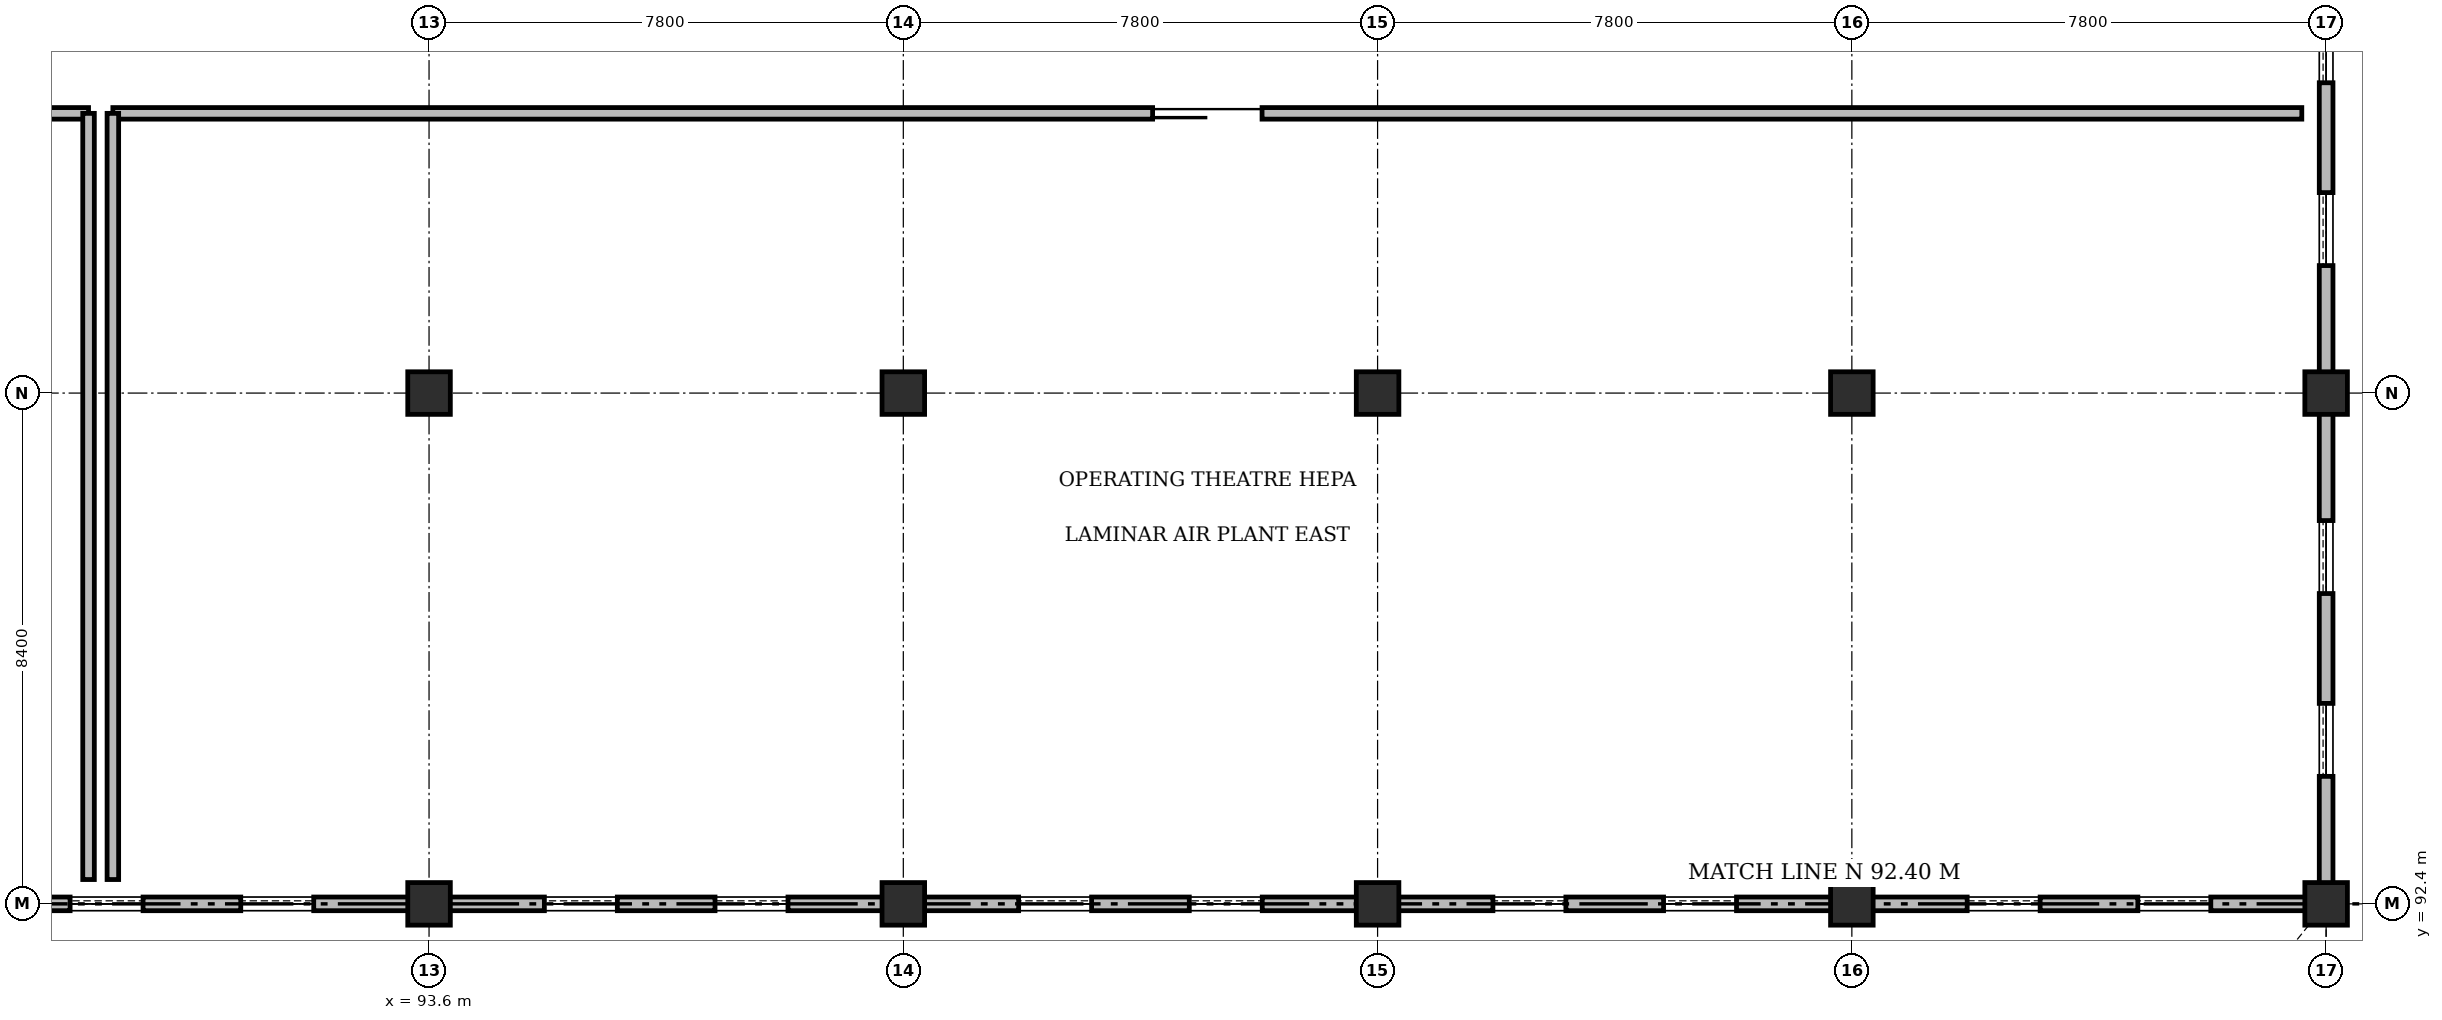
"""IFC4 building model, lengths in metres.
Left out: names, types, materials, properties, quantities, classifications, styles, units other than length and angle.
Written with IfcOpenShell. Run it as: python <this file> out.ifc"""

import sys

from ifc_helpers import new_model, si_unit, direction, frame, frame_2d, origin, origin_2d, place, context, subcontext, project, spatial, rectangle, extrude, element, fill, save


model = new_model("IFC4")
c1 = context("Model", 3, precision=1e-05, world=origin(), true_north=direction((0.0, 1.0)))
c2 = subcontext(c1, "Body", "Model", "MODEL_VIEW")
j1 = project(units=[si_unit("LENGTHUNIT", "METRE"), si_unit("PLANEANGLEUNIT", "RADIAN")], contexts=[c1])
p1 = place(None, origin())
s1 = spatial("IfcSite", under=j1, at=p1, CompositionType="ELEMENT")
p2 = place(p1, origin())
s2 = spatial("IfcBuilding", under=s1, at=p2, CompositionType="ELEMENT")
p3 = place(p2, frame((0.0, 0.0, 14.4)))
s3 = spatial("IfcBuildingStorey", under=s2, at=p3, CompositionType="ELEMENT", Elevation=14.4)
for number, where, z_axis, x_axis in (
    (1, (93.6, 92.4, 0.0), (0.0, 0.0, 1.0), (1.0, 0.0, 0.0)),
    (2, (93.6, 100.8, 0.0), (0.0, 0.0, 1.0), (1.0, 0.0, 0.0)),
    (3, (101.4, 92.4, 0.0), (0.0, 0.0, 1.0), (1.0, 0.0, 0.0)),
    (4, (101.4, 100.8, 0.0), (0.0, 0.0, 1.0), (1.0, 0.0, 0.0)),
    (5, (109.2, 92.4, 0.0), (0.0, 0.0, 1.0), (1.0, 0.0, 0.0)),
    (6, (109.2, 100.8, 0.0), (0.0, 0.0, 1.0), (1.0, 0.0, 0.0)),
    (7, (117.0, 92.4, 0.0), (0.0, 0.0, 1.0), (1.0, 0.0, 0.0)),
    (8, (117.0, 100.8, 0.0), (0.0, 0.0, 1.0), (1.0, 0.0, 0.0)),
    (9, (124.8, 92.4, 0.0), (0.0, 0.0, 1.0), (1.0, 0.0, 0.0)),
    (10, (124.8, 100.8, 0.0), (0.0, 0.0, 1.0), (1.0, 0.0, 0.0)),
):
    element("IfcColumn", number, at=place(p3, frame(where, z_axis=z_axis, x_axis=x_axis)), inside=s3, PredefinedType="COLUMN", context=c2, shape_type="SweptSolid", body=[
        extrude(rectangle(XDim=0.7, YDim=0.7, at=origin_2d()), origin(), (0.0, 0.0, 1.0), 3.6),
    ])
p4 = place(p3, frame((93.31, 92.4, 0.0), z_axis=(0.0, 0.0, 1.0), x_axis=(-1.0, 0.0, 0.0)))
e11 = element("IfcWall", 11, at=p4, inside=s3, PredefinedType="STANDARD", context=c2, shape_type="SweptSolid", body=[
    extrude(rectangle(XDim=7.22, YDim=0.225, at=frame_2d((3.61, 0.0))), origin(), (0.0, 0.0, 1.0), 2.62),
])
p5 = place(p4, frame((1.607, 0.0, 0.9)))
e12 = element("IfcOpeningElement", 12, at=p5, cuts=e11, PredefinedType="OPENING", context=c2, shape_type="SweptSolid", body=[
    extrude(rectangle(XDim=1.2, YDim=1.05, at=frame_2d((0.6, 0.525))), frame((0.0, 0.123, 0.0), z_axis=(0.0, -1.0, 0.0), x_axis=(1.0, 0.0, 0.0)), (0.0, 0.0, 1.0), 0.245),
])
p6 = place(p4, frame((4.413, 0.0, 0.9)))
e13 = element("IfcOpeningElement", 13, at=p6, cuts=e11, PredefinedType="OPENING", context=c2, shape_type="SweptSolid", body=[
    extrude(rectangle(XDim=1.2, YDim=1.05, at=frame_2d((0.6, 0.525))), frame((0.0, 0.123, 0.0), z_axis=(0.0, -1.0, 0.0), x_axis=(1.0, 0.0, 0.0)), (0.0, 0.0, 1.0), 0.245),
])
p7 = place(p3, frame((101.11, 92.4, 0.0), z_axis=(0.0, 0.0, 1.0), x_axis=(-1.0, 0.0, 0.0)))
e14 = element("IfcWall", 14, at=p7, inside=s3, PredefinedType="STANDARD", context=c2, shape_type="SweptSolid", body=[
    extrude(rectangle(XDim=7.22, YDim=0.225, at=frame_2d((3.61, 0.0))), origin(), (0.0, 0.0, 1.0), 2.62),
])
p8 = place(p7, frame((1.607, 0.0, 0.9)))
e15 = element("IfcOpeningElement", 15, at=p8, cuts=e14, PredefinedType="OPENING", context=c2, shape_type="SweptSolid", body=[
    extrude(rectangle(XDim=1.2, YDim=1.05, at=frame_2d((0.6, 0.525))), frame((0.0, 0.123, 0.0), z_axis=(0.0, -1.0, 0.0), x_axis=(1.0, 0.0, 0.0)), (0.0, 0.0, 1.0), 0.245),
])
p9 = place(p7, frame((4.413, 0.0, 0.9)))
e16 = element("IfcOpeningElement", 16, at=p9, cuts=e14, PredefinedType="OPENING", context=c2, shape_type="SweptSolid", body=[
    extrude(rectangle(XDim=1.2, YDim=1.05, at=frame_2d((0.6, 0.525))), frame((0.0, 0.123, 0.0), z_axis=(0.0, -1.0, 0.0), x_axis=(1.0, 0.0, 0.0)), (0.0, 0.0, 1.0), 0.245),
])
p10 = place(p3, frame((108.91, 92.4, 0.0), z_axis=(0.0, 0.0, 1.0), x_axis=(-1.0, 0.0, 0.0)))
e17 = element("IfcWall", 17, at=p10, inside=s3, PredefinedType="STANDARD", context=c2, shape_type="SweptSolid", body=[
    extrude(rectangle(XDim=7.22, YDim=0.225, at=frame_2d((3.61, 0.0))), origin(), (0.0, 0.0, 1.0), 2.62),
])
p11 = place(p10, frame((1.607, 0.0, 0.9)))
e18 = element("IfcOpeningElement", 18, at=p11, cuts=e17, PredefinedType="OPENING", context=c2, shape_type="SweptSolid", body=[
    extrude(rectangle(XDim=1.2, YDim=1.05, at=frame_2d((0.6, 0.525))), frame((0.0, 0.123, 0.0), z_axis=(0.0, -1.0, 0.0), x_axis=(1.0, 0.0, 0.0)), (0.0, 0.0, 1.0), 0.245),
])
p12 = place(p10, frame((4.413, 0.0, 0.9)))
e19 = element("IfcOpeningElement", 19, at=p12, cuts=e17, PredefinedType="OPENING", context=c2, shape_type="SweptSolid", body=[
    extrude(rectangle(XDim=1.2, YDim=1.05, at=frame_2d((0.6, 0.525))), frame((0.0, 0.123, 0.0), z_axis=(0.0, -1.0, 0.0), x_axis=(1.0, 0.0, 0.0)), (0.0, 0.0, 1.0), 0.245),
])
p13 = place(p3, frame((116.71, 92.4, 0.0), z_axis=(0.0, 0.0, 1.0), x_axis=(-1.0, 0.0, 0.0)))
e20 = element("IfcWall", 20, at=p13, inside=s3, PredefinedType="STANDARD", context=c2, shape_type="SweptSolid", body=[
    extrude(rectangle(XDim=7.22, YDim=0.225, at=frame_2d((3.61, 0.0))), origin(), (0.0, 0.0, 1.0), 2.62),
])
p14 = place(p13, frame((1.607, 0.0, 0.9)))
e21 = element("IfcOpeningElement", 21, at=p14, cuts=e20, PredefinedType="OPENING", context=c2, shape_type="SweptSolid", body=[
    extrude(rectangle(XDim=1.2, YDim=1.05, at=frame_2d((0.6, 0.525))), frame((0.0, 0.123, 0.0), z_axis=(0.0, -1.0, 0.0), x_axis=(1.0, 0.0, 0.0)), (0.0, 0.0, 1.0), 0.245),
])
p15 = place(p13, frame((4.413, 0.0, 0.9)))
e22 = element("IfcOpeningElement", 22, at=p15, cuts=e20, PredefinedType="OPENING", context=c2, shape_type="SweptSolid", body=[
    extrude(rectangle(XDim=1.2, YDim=1.05, at=frame_2d((0.6, 0.525))), frame((0.0, 0.123, 0.0), z_axis=(0.0, -1.0, 0.0), x_axis=(1.0, 0.0, 0.0)), (0.0, 0.0, 1.0), 0.245),
])
p16 = place(p3, frame((124.51, 92.4, 0.0), z_axis=(0.0, 0.0, 1.0), x_axis=(-1.0, 0.0, 0.0)))
e23 = element("IfcWall", 23, at=p16, inside=s3, PredefinedType="STANDARD", context=c2, shape_type="SweptSolid", body=[
    extrude(rectangle(XDim=7.22, YDim=0.225, at=frame_2d((3.61, 0.0))), origin(), (0.0, 0.0, 1.0), 2.62),
])
p17 = place(p16, frame((1.607, 0.0, 0.9)))
e24 = element("IfcOpeningElement", 24, at=p17, cuts=e23, PredefinedType="OPENING", context=c2, shape_type="SweptSolid", body=[
    extrude(rectangle(XDim=1.2, YDim=1.05, at=frame_2d((0.6, 0.525))), frame((0.0, 0.123, 0.0), z_axis=(0.0, -1.0, 0.0), x_axis=(1.0, 0.0, 0.0)), (0.0, 0.0, 1.0), 0.245),
])
p18 = place(p16, frame((4.413, 0.0, 0.9)))
e25 = element("IfcOpeningElement", 25, at=p18, cuts=e23, PredefinedType="OPENING", context=c2, shape_type="SweptSolid", body=[
    extrude(rectangle(XDim=1.2, YDim=1.05, at=frame_2d((0.6, 0.525))), frame((0.0, 0.123, 0.0), z_axis=(0.0, -1.0, 0.0), x_axis=(1.0, 0.0, 0.0)), (0.0, 0.0, 1.0), 0.245),
])
p19 = place(p3, frame((124.8, 100.51, 0.0), z_axis=(0.0, 0.0, 1.0), x_axis=(0.0, -1.0, 0.0)))
e26 = element("IfcWall", 26, at=p19, inside=s3, PredefinedType="STANDARD", context=c2, shape_type="SweptSolid", body=[
    extrude(rectangle(XDim=7.82, YDim=0.225, at=frame_2d((3.91, 0.0))), origin(), (0.0, 0.0, 1.0), 2.605),
])
p20 = place(p19, frame((1.807, 0.0, 0.9)))
e27 = element("IfcOpeningElement", 27, at=p20, cuts=e26, PredefinedType="OPENING", context=c2, shape_type="SweptSolid", body=[
    extrude(rectangle(XDim=1.2, YDim=1.05, at=frame_2d((0.6, 0.525))), frame((0.0, 0.123, 0.0), z_axis=(0.0, -1.0, 0.0), x_axis=(1.0, 0.0, 0.0)), (0.0, 0.0, 1.0), 0.245),
])
p21 = place(p19, frame((4.813, 0.0, 0.9)))
e28 = element("IfcOpeningElement", 28, at=p21, cuts=e26, PredefinedType="OPENING", context=c2, shape_type="SweptSolid", body=[
    extrude(rectangle(XDim=1.2, YDim=1.05, at=frame_2d((0.6, 0.525))), frame((0.0, 0.123, 0.0), z_axis=(0.0, -1.0, 0.0), x_axis=(1.0, 0.0, 0.0)), (0.0, 0.0, 1.0), 0.245),
])
p22 = place(p3, frame((124.8, 108.91, 0.0), z_axis=(0.0, 0.0, 1.0), x_axis=(0.0, -1.0, 0.0)))
e29 = element("IfcWall", 29, at=p22, inside=s3, PredefinedType="STANDARD", context=c2, shape_type="SweptSolid", body=[
    extrude(rectangle(XDim=7.82, YDim=0.225, at=frame_2d((3.91, 0.0))), origin(), (0.0, 0.0, 1.0), 2.605),
])
p23 = place(p22, frame((1.807, 0.0, 0.9)))
e30 = element("IfcOpeningElement", 30, at=p23, cuts=e29, PredefinedType="OPENING", context=c2, shape_type="SweptSolid", body=[
    extrude(rectangle(XDim=1.2, YDim=1.05, at=frame_2d((0.6, 0.525))), frame((0.0, 0.123, 0.0), z_axis=(0.0, -1.0, 0.0), x_axis=(1.0, 0.0, 0.0)), (0.0, 0.0, 1.0), 0.245),
])
p24 = place(p22, frame((4.813, 0.0, 0.9)))
e31 = element("IfcOpeningElement", 31, at=p24, cuts=e29, PredefinedType="OPENING", context=c2, shape_type="SweptSolid", body=[
    extrude(rectangle(XDim=1.2, YDim=1.05, at=frame_2d((0.6, 0.525))), frame((0.0, 0.123, 0.0), z_axis=(0.0, -1.0, 0.0), x_axis=(1.0, 0.0, 0.0)), (0.0, 0.0, 1.0), 0.245),
])
p25 = place(p3, frame((55.0, 105.4, 0.0), z_axis=(0.0, 0.0, 1.0), x_axis=(1.0, 0.0, 0.0)))
e32 = element("IfcWall", 32, at=p25, inside=s3, PredefinedType="PARTITIONING", context=c2, shape_type="SweptSolid", body=[
    extrude(rectangle(XDim=33.0, YDim=0.19, at=frame_2d((16.5, 0.0))), origin(), (0.0, 0.0, 1.0), 3.3),
])
p26 = place(p25, frame((15.6, 0.0, 0.0)))
e33 = element("IfcOpeningElement", 33, at=p26, cuts=e32, PredefinedType="OPENING", context=c2, shape_type="SweptSolid", body=[
    extrude(rectangle(XDim=1.8, YDim=2.3, at=frame_2d((0.9, 1.15))), frame((0.0, 0.105, 0.0), z_axis=(0.0, -1.0, 0.0), x_axis=(1.0, 0.0, 0.0)), (0.0, 0.0, 1.0), 0.21),
])
p27 = place(p3, frame((88.0, 92.8, 0.0), z_axis=(0.0, 0.0, 1.0), x_axis=(0.0, 1.0, 0.0)))
e34 = element("IfcWall", 34, at=p27, inside=s3, PredefinedType="PARTITIONING", context=c2, shape_type="SweptSolid", body=[
    extrude(rectangle(XDim=12.6, YDim=0.19, at=frame_2d((6.3, 0.0))), origin(), (0.0, 0.0, 1.0), 3.3),
])
p28 = place(p3, frame((88.4, 105.4, 0.0), z_axis=(0.0, 0.0, 1.0), x_axis=(1.0, 0.0, 0.0)))
e35 = element("IfcWall", 35, at=p28, inside=s3, PredefinedType="PARTITIONING", context=c2, shape_type="SweptSolid", body=[
    extrude(rectangle(XDim=36.0, YDim=0.19, at=frame_2d((18.0, 0.0))), origin(), (0.0, 0.0, 1.0), 3.3),
])
p29 = place(p28, frame((17.1, 0.0, 0.0)))
e36 = element("IfcOpeningElement", 36, at=p29, cuts=e35, PredefinedType="OPENING", context=c2, shape_type="SweptSolid", body=[
    extrude(rectangle(XDim=1.8, YDim=2.3, at=frame_2d((0.9, 1.15))), frame((0.0, 0.105, 0.0), z_axis=(0.0, -1.0, 0.0), x_axis=(1.0, 0.0, 0.0)), (0.0, 0.0, 1.0), 0.21),
])
p30 = place(p3, frame((88.4, 92.8, 0.0), z_axis=(0.0, 0.0, 1.0), x_axis=(0.0, 1.0, 0.0)))
e37 = element("IfcWall", 37, at=p30, inside=s3, PredefinedType="PARTITIONING", context=c2, shape_type="SweptSolid", body=[
    extrude(rectangle(XDim=12.6, YDim=0.19, at=frame_2d((6.3, 0.0))), origin(), (0.0, 0.0, 1.0), 3.3),
])
p31 = place(p5, origin())
e38 = element("IfcWindow", 38, at=p31, inside=s3, PartitioningType="SINGLE_PANEL", PredefinedType="WINDOW", context=c2, shape_type="SweptSolid", body=[
    extrude(rectangle(XDim=1.2, YDim=1.05, at=frame_2d((0.6, 0.525))), frame((0.0, 0.03, 0.0), z_axis=(0.0, -1.0, 0.0), x_axis=(1.0, 0.0, 0.0)), (0.0, 0.0, 1.0), 0.06),
])
fill(e12, e38)
p32 = place(p6, origin())
e39 = element("IfcWindow", 39, at=p32, inside=s3, PartitioningType="SINGLE_PANEL", PredefinedType="WINDOW", context=c2, shape_type="SweptSolid", body=[
    extrude(rectangle(XDim=1.2, YDim=1.05, at=frame_2d((0.6, 0.525))), frame((0.0, 0.03, 0.0), z_axis=(0.0, -1.0, 0.0), x_axis=(1.0, 0.0, 0.0)), (0.0, 0.0, 1.0), 0.06),
])
fill(e13, e39)
p33 = place(p8, origin())
e40 = element("IfcWindow", 40, at=p33, inside=s3, PartitioningType="SINGLE_PANEL", PredefinedType="WINDOW", context=c2, shape_type="SweptSolid", body=[
    extrude(rectangle(XDim=1.2, YDim=1.05, at=frame_2d((0.6, 0.525))), frame((0.0, 0.03, 0.0), z_axis=(0.0, -1.0, 0.0), x_axis=(1.0, 0.0, 0.0)), (0.0, 0.0, 1.0), 0.06),
])
fill(e15, e40)
p34 = place(p9, origin())
e41 = element("IfcWindow", 41, at=p34, inside=s3, PartitioningType="SINGLE_PANEL", PredefinedType="WINDOW", context=c2, shape_type="SweptSolid", body=[
    extrude(rectangle(XDim=1.2, YDim=1.05, at=frame_2d((0.6, 0.525))), frame((0.0, 0.03, 0.0), z_axis=(0.0, -1.0, 0.0), x_axis=(1.0, 0.0, 0.0)), (0.0, 0.0, 1.0), 0.06),
])
fill(e16, e41)
p35 = place(p11, origin())
e42 = element("IfcWindow", 42, at=p35, inside=s3, PartitioningType="SINGLE_PANEL", PredefinedType="WINDOW", context=c2, shape_type="SweptSolid", body=[
    extrude(rectangle(XDim=1.2, YDim=1.05, at=frame_2d((0.6, 0.525))), frame((0.0, 0.03, 0.0), z_axis=(0.0, -1.0, 0.0), x_axis=(1.0, 0.0, 0.0)), (0.0, 0.0, 1.0), 0.06),
])
fill(e18, e42)
p36 = place(p12, origin())
e43 = element("IfcWindow", 43, at=p36, inside=s3, PartitioningType="SINGLE_PANEL", PredefinedType="WINDOW", context=c2, shape_type="SweptSolid", body=[
    extrude(rectangle(XDim=1.2, YDim=1.05, at=frame_2d((0.6, 0.525))), frame((0.0, 0.03, 0.0), z_axis=(0.0, -1.0, 0.0), x_axis=(1.0, 0.0, 0.0)), (0.0, 0.0, 1.0), 0.06),
])
fill(e19, e43)
p37 = place(p14, origin())
e44 = element("IfcWindow", 44, at=p37, inside=s3, PartitioningType="SINGLE_PANEL", PredefinedType="WINDOW", context=c2, shape_type="SweptSolid", body=[
    extrude(rectangle(XDim=1.2, YDim=1.05, at=frame_2d((0.6, 0.525))), frame((0.0, 0.03, 0.0), z_axis=(0.0, -1.0, 0.0), x_axis=(1.0, 0.0, 0.0)), (0.0, 0.0, 1.0), 0.06),
])
fill(e21, e44)
p38 = place(p15, origin())
e45 = element("IfcWindow", 45, at=p38, inside=s3, PartitioningType="SINGLE_PANEL", PredefinedType="WINDOW", context=c2, shape_type="SweptSolid", body=[
    extrude(rectangle(XDim=1.2, YDim=1.05, at=frame_2d((0.6, 0.525))), frame((0.0, 0.03, 0.0), z_axis=(0.0, -1.0, 0.0), x_axis=(1.0, 0.0, 0.0)), (0.0, 0.0, 1.0), 0.06),
])
fill(e22, e45)
p39 = place(p17, origin())
e46 = element("IfcWindow", 46, at=p39, inside=s3, PartitioningType="SINGLE_PANEL", PredefinedType="WINDOW", context=c2, shape_type="SweptSolid", body=[
    extrude(rectangle(XDim=1.2, YDim=1.05, at=frame_2d((0.6, 0.525))), frame((0.0, 0.03, 0.0), z_axis=(0.0, -1.0, 0.0), x_axis=(1.0, 0.0, 0.0)), (0.0, 0.0, 1.0), 0.06),
])
fill(e24, e46)
p40 = place(p18, origin())
e47 = element("IfcWindow", 47, at=p40, inside=s3, PartitioningType="SINGLE_PANEL", PredefinedType="WINDOW", context=c2, shape_type="SweptSolid", body=[
    extrude(rectangle(XDim=1.2, YDim=1.05, at=frame_2d((0.6, 0.525))), frame((0.0, 0.03, 0.0), z_axis=(0.0, -1.0, 0.0), x_axis=(1.0, 0.0, 0.0)), (0.0, 0.0, 1.0), 0.06),
])
fill(e25, e47)
p41 = place(p20, origin())
e48 = element("IfcWindow", 48, at=p41, inside=s3, PartitioningType="SINGLE_PANEL", PredefinedType="WINDOW", context=c2, shape_type="SweptSolid", body=[
    extrude(rectangle(XDim=1.2, YDim=1.05, at=frame_2d((0.6, 0.525))), frame((0.0, 0.03, 0.0), z_axis=(0.0, -1.0, 0.0), x_axis=(1.0, 0.0, 0.0)), (0.0, 0.0, 1.0), 0.06),
])
fill(e27, e48)
p42 = place(p21, origin())
e49 = element("IfcWindow", 49, at=p42, inside=s3, PartitioningType="SINGLE_PANEL", PredefinedType="WINDOW", context=c2, shape_type="SweptSolid", body=[
    extrude(rectangle(XDim=1.2, YDim=1.05, at=frame_2d((0.6, 0.525))), frame((0.0, 0.03, 0.0), z_axis=(0.0, -1.0, 0.0), x_axis=(1.0, 0.0, 0.0)), (0.0, 0.0, 1.0), 0.06),
])
fill(e28, e49)
p43 = place(p23, origin())
e50 = element("IfcWindow", 50, at=p43, inside=s3, PartitioningType="SINGLE_PANEL", PredefinedType="WINDOW", context=c2, shape_type="SweptSolid", body=[
    extrude(rectangle(XDim=1.2, YDim=1.05, at=frame_2d((0.6, 0.525))), frame((0.0, 0.03, 0.0), z_axis=(0.0, -1.0, 0.0), x_axis=(1.0, 0.0, 0.0)), (0.0, 0.0, 1.0), 0.06),
])
fill(e30, e50)
p44 = place(p24, origin())
e51 = element("IfcWindow", 51, at=p44, inside=s3, PartitioningType="SINGLE_PANEL", PredefinedType="WINDOW", context=c2, shape_type="SweptSolid", body=[
    extrude(rectangle(XDim=1.2, YDim=1.05, at=frame_2d((0.6, 0.525))), frame((0.0, 0.03, 0.0), z_axis=(0.0, -1.0, 0.0), x_axis=(1.0, 0.0, 0.0)), (0.0, 0.0, 1.0), 0.06),
])
fill(e31, e51)
p45 = place(p29, origin())
e52 = element("IfcDoor", 52, at=p45, inside=s3, OperationType="SLIDING_TO_LEFT", PredefinedType="DOOR", context=c2, shape_type="SweptSolid", body=[
    extrude(rectangle(XDim=1.8, YDim=2.3, at=frame_2d((0.9, 1.15))), frame((0.0, 0.025, 0.0), z_axis=(0.0, -1.0, 0.0), x_axis=(1.0, 0.0, 0.0)), (0.0, 0.0, 1.0), 0.05),
])
fill(e36, e52)
save(model, sys.argv[1])
